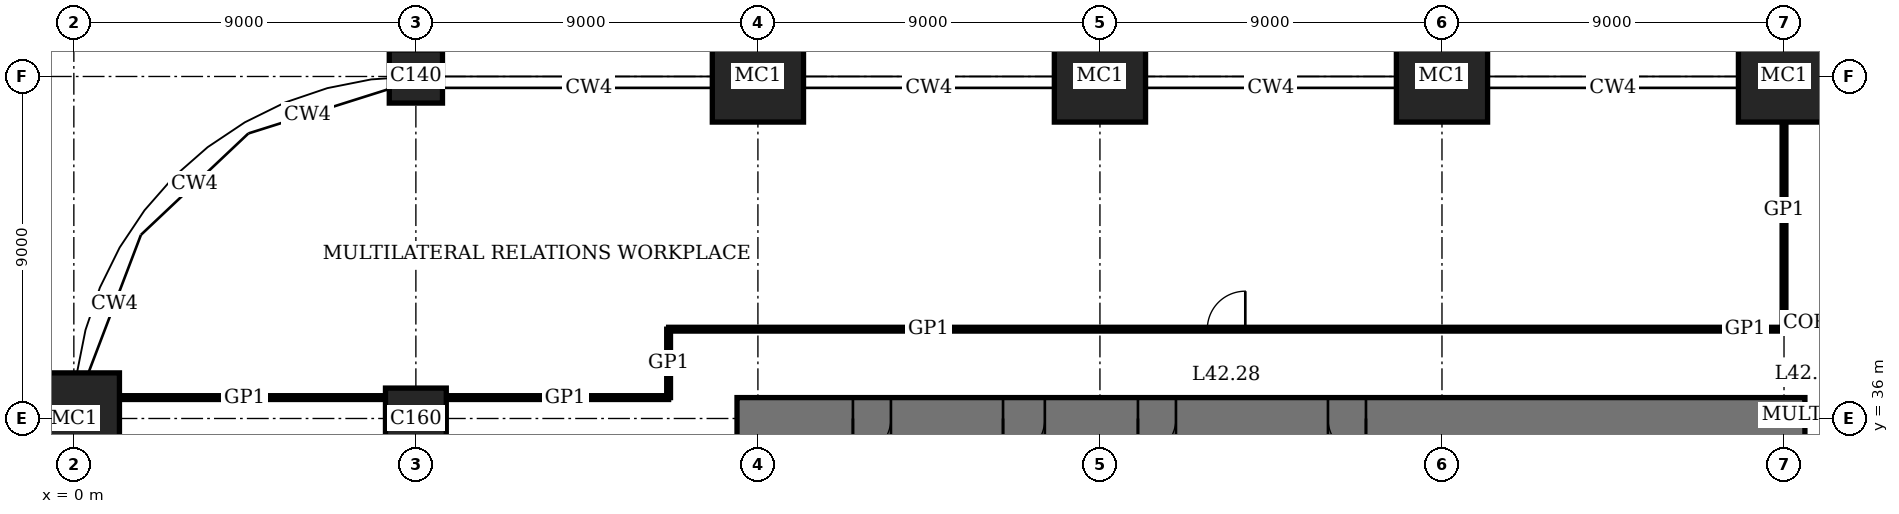
"""IFC4 building model, lengths in metres.
Left out: names, types, materials, properties, quantities, classifications, styles, units other than length and angle.
Written with IfcOpenShell. Run it as: python <this file> out.ifc"""

import sys

from ifc_helpers import new_model, si_unit, direction, frame, frame_2d, origin, origin_2d, place, context, subcontext, project, spatial, rectangle, extrude, element, fill, save


model = new_model("IFC4")
c1 = context("Model", 3, precision=1e-05, world=origin(), true_north=direction((0.0, 1.0)))
c2 = subcontext(c1, "Body", "Model", "MODEL_VIEW")
j1 = project(units=[si_unit("LENGTHUNIT", "METRE"), si_unit("PLANEANGLEUNIT", "RADIAN")], contexts=[c1])
p1 = place(None, origin())
s1 = spatial("IfcSite", under=j1, at=p1, CompositionType="ELEMENT")
p2 = place(p1, origin())
s2 = spatial("IfcBuilding", under=s1, at=p2, CompositionType="ELEMENT")
p3 = place(p2, frame((0.0, 0.0, 174.2)))
s3 = spatial("IfcBuildingStorey", under=s2, at=p3, CompositionType="ELEMENT", Elevation=174.2)
p4 = place(p3, frame((0.0, 36.0, 0.0), z_axis=(0.0, 0.0, 1.0), x_axis=(1.0, 0.0, 0.0)))
e1 = element("IfcColumn", 1, at=p4, inside=s3, PredefinedType="COLUMN", context=c2, shape_type="SweptSolid", body=[
    extrude(rectangle(XDim=2.4, YDim=2.4, at=origin_2d()), origin(), (0.0, 0.0, 1.0), 4.0),
])
p5 = place(p3, frame((9.0, 36.0, 0.0), z_axis=(0.0, 0.0, 1.0), x_axis=(1.0, 0.0, 0.0)))
e2 = element("IfcColumn", 2, at=p5, inside=s3, PredefinedType="COLUMN", context=c2, shape_type="SweptSolid", body=[
    extrude(rectangle(XDim=1.6, YDim=1.6, at=origin_2d()), origin(), (0.0, 0.0, 1.0), 4.0),
])
p6 = place(p3, frame((9.0, 45.0, 0.0), z_axis=(0.0, 0.0, 1.0), x_axis=(1.0, 0.0, 0.0)))
e3 = element("IfcColumn", 3, at=p6, inside=s3, PredefinedType="COLUMN", context=c2, shape_type="SweptSolid", body=[
    extrude(rectangle(XDim=1.4, YDim=1.4, at=origin_2d()), origin(), (0.0, 0.0, 1.0), 4.0),
])
for number, where, z_axis, x_axis in (
    (4, (18.0, 45.0, 0.0), (0.0, 0.0, 1.0), (1.0, 0.0, 0.0)),
    (5, (27.0, 45.0, 0.0), (0.0, 0.0, 1.0), (1.0, 0.0, 0.0)),
    (6, (36.0, 45.0, 0.0), (0.0, 0.0, 1.0), (1.0, 0.0, 0.0)),
    (7, (45.0, 45.0, 0.0), (0.0, 0.0, 1.0), (1.0, 0.0, 0.0)),
):
    element("IfcColumn", number, at=place(p3, frame(where, z_axis=z_axis, x_axis=x_axis)), inside=s3, PredefinedType="COLUMN", context=c2, shape_type="SweptSolid", body=[
        extrude(rectangle(XDim=2.4, YDim=2.4, at=origin_2d()), origin(), (0.0, 0.0, 1.0), 4.0),
    ])
p7 = place(p3, frame((45.55, 36.0, 0.0), z_axis=(0.0, 0.0, 1.0), x_axis=(-1.0, 0.0, 0.0)))
e8 = element("IfcWall", 8, at=p7, inside=s3, PredefinedType="SHEAR", context=c2, shape_type="SweptSolid", body=[
    extrude(rectangle(XDim=28.1, YDim=1.1, at=frame_2d((14.05, 0.0))), origin(), (0.0, 0.0, 1.0), 4.0),
])
p8 = place(p7, frame((11.55, 0.0, 0.0)))
e9 = element("IfcOpeningElement", 9, at=p8, cuts=e8, PredefinedType="OPENING", context=c2, shape_type="SweptSolid", body=[
    extrude(rectangle(XDim=1.0, YDim=2.4, at=frame_2d((0.5, 1.2))), frame((0.0, 0.56, 0.0), z_axis=(0.0, -1.0, 0.0), x_axis=(1.0, 0.0, 0.0)), (0.0, 0.0, 1.0), 1.12),
])
p9 = place(p7, frame((16.55, 0.0, 0.0)))
e10 = element("IfcOpeningElement", 10, at=p9, cuts=e8, PredefinedType="OPENING", context=c2, shape_type="SweptSolid", body=[
    extrude(rectangle(XDim=1.0, YDim=2.4, at=frame_2d((0.5, 1.2))), frame((0.0, 0.56, 0.0), z_axis=(0.0, -1.0, 0.0), x_axis=(1.0, 0.0, 0.0)), (0.0, 0.0, 1.0), 1.12),
])
p10 = place(p7, frame((20.0, 0.0, 0.0)))
e11 = element("IfcOpeningElement", 11, at=p10, cuts=e8, PredefinedType="OPENING", context=c2, shape_type="SweptSolid", body=[
    extrude(rectangle(XDim=1.1, YDim=2.4, at=frame_2d((0.55, 1.2))), frame((0.0, 0.56, 0.0), z_axis=(0.0, -1.0, 0.0), x_axis=(1.0, 0.0, 0.0)), (0.0, 0.0, 1.0), 1.12),
])
p11 = place(p7, frame((24.05, 0.0, 0.0)))
e12 = element("IfcOpeningElement", 12, at=p11, cuts=e8, PredefinedType="OPENING", context=c2, shape_type="SweptSolid", body=[
    extrude(rectangle(XDim=1.0, YDim=2.4, at=frame_2d((0.5, 1.2))), frame((0.0, 0.56, 0.0), z_axis=(0.0, -1.0, 0.0), x_axis=(1.0, 0.0, 0.0)), (0.0, 0.0, 1.0), 1.12),
])
p12 = place(p3, frame((1.2, 36.55, 0.0), z_axis=(0.0, 0.0, 1.0), x_axis=(1.0, 0.0, 0.0)))
e13 = element("IfcWall", 13, at=p12, inside=s3, PredefinedType="PARTITIONING", context=c2, shape_type="SweptSolid", body=[
    extrude(rectangle(XDim=7.0, YDim=0.1, at=frame_2d((3.5, 0.0))), origin(), (0.0, 0.0, 1.0), 3.75),
])
p13 = place(p3, frame((9.8, 36.55, 0.0), z_axis=(0.0, 0.0, 1.0), x_axis=(1.0, 0.0, 0.0)))
e14 = element("IfcWall", 14, at=p13, inside=s3, PredefinedType="PARTITIONING", context=c2, shape_type="SweptSolid", body=[
    extrude(rectangle(XDim=5.85, YDim=0.1, at=frame_2d((2.925, 0.0))), origin(), (0.0, 0.0, 1.0), 3.75),
])
p14 = place(p3, frame((15.65, 38.35, 0.0), z_axis=(0.0, 0.0, 1.0), x_axis=(1.0, 0.0, 0.0)))
e15 = element("IfcWall", 15, at=p14, inside=s3, PredefinedType="PARTITIONING", context=c2, shape_type="SweptSolid", body=[
    extrude(rectangle(XDim=29.35, YDim=0.1, at=frame_2d((14.675, 0.0))), origin(), (0.0, 0.0, 1.0), 3.75),
])
p15 = place(p14, frame((14.175, 0.0, 0.0)))
e16 = element("IfcOpeningElement", 16, at=p15, cuts=e15, PredefinedType="OPENING", context=c2, shape_type="SweptSolid", body=[
    extrude(rectangle(XDim=1.0, YDim=2.4, at=frame_2d((0.5, 1.2))), frame((0.0, 0.06, 0.0), z_axis=(0.0, -1.0, 0.0), x_axis=(1.0, 0.0, 0.0)), (0.0, 0.0, 1.0), 0.12),
])
p16 = place(p3, frame((45.0, 38.35, 0.0), z_axis=(0.0, 0.0, 1.0), x_axis=(1.0, 0.0, 0.0)))
e17 = element("IfcWall", 17, at=p16, inside=s3, PredefinedType="PARTITIONING", context=c2, shape_type="SweptSolid", body=[
    extrude(rectangle(XDim=2.35, YDim=0.1, at=frame_2d((1.175, 0.0))), origin(), (0.0, 0.0, 1.0), 3.75),
])
p17 = place(p3, frame((15.65, 36.55, 0.0), z_axis=(0.0, 0.0, 1.0), x_axis=(0.0, 1.0, 0.0)))
e18 = element("IfcWall", 18, at=p17, inside=s3, PredefinedType="PARTITIONING", context=c2, shape_type="SweptSolid", body=[
    extrude(rectangle(XDim=1.8, YDim=0.1, at=frame_2d((0.9, 0.0))), origin(), (0.0, 0.0, 1.0), 3.75),
])
p18 = place(p3, frame((45.0, 38.35, 0.0), z_axis=(0.0, 0.0, 1.0), x_axis=(0.0, 1.0, 0.0)))
e19 = element("IfcWall", 19, at=p18, inside=s3, PredefinedType="PARTITIONING", context=c2, shape_type="SweptSolid", body=[
    extrude(rectangle(XDim=5.45, YDim=0.1, at=frame_2d((2.725, 0.0))), origin(), (0.0, 0.0, 1.0), 3.05),
])
p19 = place(p8, origin())
e20 = element("IfcDoor", 20, at=p19, inside=s3, OperationType="SINGLE_SWING_RIGHT", PredefinedType="DOOR", context=c2, shape_type="SweptSolid", body=[
    extrude(rectangle(XDim=1.0, YDim=2.4, at=frame_2d((0.5, 1.2))), frame((0.0, 0.025, 0.0), z_axis=(0.0, -1.0, 0.0), x_axis=(1.0, 0.0, 0.0)), (0.0, 0.0, 1.0), 0.05),
    extrude(rectangle(XDim=0.04, YDim=2.4, at=frame_2d((0.02, 1.2))), frame((0.0, 0.4, 0.0), z_axis=(0.0, -1.0, 0.0), x_axis=(1.0, 0.0, 0.0)), (0.0, 0.0, 1.0), 0.8),
    extrude(rectangle(XDim=0.04, YDim=2.4, at=frame_2d((0.98, 1.2))), frame((0.0, 0.4, 0.0), z_axis=(0.0, -1.0, 0.0), x_axis=(1.0, 0.0, 0.0)), (0.0, 0.0, 1.0), 0.8),
    extrude(rectangle(XDim=1.0, YDim=0.04, at=frame_2d((0.5, 2.38))), frame((0.0, 0.4, 0.0), z_axis=(0.0, -1.0, 0.0), x_axis=(1.0, 0.0, 0.0)), (0.0, 0.0, 1.0), 0.8),
])
fill(e9, e20)
p20 = place(p9, origin())
e21 = element("IfcDoor", 21, at=p20, inside=s3, OperationType="SINGLE_SWING_LEFT", PredefinedType="DOOR", context=c2, shape_type="SweptSolid", body=[
    extrude(rectangle(XDim=1.0, YDim=2.4, at=frame_2d((0.5, 1.2))), frame((0.0, 0.025, 0.0), z_axis=(0.0, -1.0, 0.0), x_axis=(1.0, 0.0, 0.0)), (0.0, 0.0, 1.0), 0.05),
    extrude(rectangle(XDim=0.04, YDim=2.4, at=frame_2d((0.02, 1.2))), frame((0.0, 0.4, 0.0), z_axis=(0.0, -1.0, 0.0), x_axis=(1.0, 0.0, 0.0)), (0.0, 0.0, 1.0), 0.8),
    extrude(rectangle(XDim=0.04, YDim=2.4, at=frame_2d((0.98, 1.2))), frame((0.0, 0.4, 0.0), z_axis=(0.0, -1.0, 0.0), x_axis=(1.0, 0.0, 0.0)), (0.0, 0.0, 1.0), 0.8),
    extrude(rectangle(XDim=1.0, YDim=0.04, at=frame_2d((0.5, 2.38))), frame((0.0, 0.4, 0.0), z_axis=(0.0, -1.0, 0.0), x_axis=(1.0, 0.0, 0.0)), (0.0, 0.0, 1.0), 0.8),
])
fill(e10, e21)
p21 = place(p10, origin())
e22 = element("IfcDoor", 22, at=p21, inside=s3, OperationType="SINGLE_SWING_LEFT", PredefinedType="DOOR", context=c2, shape_type="SweptSolid", body=[
    extrude(rectangle(XDim=1.1, YDim=2.4, at=frame_2d((0.55, 1.2))), frame((0.0, 0.025, 0.0), z_axis=(0.0, -1.0, 0.0), x_axis=(1.0, 0.0, 0.0)), (0.0, 0.0, 1.0), 0.05),
    extrude(rectangle(XDim=0.04, YDim=2.4, at=frame_2d((0.02, 1.2))), frame((0.0, 0.44, 0.0), z_axis=(0.0, -1.0, 0.0), x_axis=(1.0, 0.0, 0.0)), (0.0, 0.0, 1.0), 0.88),
    extrude(rectangle(XDim=0.04, YDim=2.4, at=frame_2d((1.08, 1.2))), frame((0.0, 0.44, 0.0), z_axis=(0.0, -1.0, 0.0), x_axis=(1.0, 0.0, 0.0)), (0.0, 0.0, 1.0), 0.88),
    extrude(rectangle(XDim=1.1, YDim=0.04, at=frame_2d((0.55, 2.38))), frame((0.0, 0.44, 0.0), z_axis=(0.0, -1.0, 0.0), x_axis=(1.0, 0.0, 0.0)), (0.0, 0.0, 1.0), 0.88),
])
fill(e11, e22)
p22 = place(p11, origin())
e23 = element("IfcDoor", 23, at=p22, inside=s3, OperationType="SINGLE_SWING_LEFT", PredefinedType="DOOR", context=c2, shape_type="SweptSolid", body=[
    extrude(rectangle(XDim=1.0, YDim=2.4, at=frame_2d((0.5, 1.2))), frame((0.0, 0.025, 0.0), z_axis=(0.0, -1.0, 0.0), x_axis=(1.0, 0.0, 0.0)), (0.0, 0.0, 1.0), 0.05),
    extrude(rectangle(XDim=0.04, YDim=2.4, at=frame_2d((0.02, 1.2))), frame((0.0, 0.4, 0.0), z_axis=(0.0, -1.0, 0.0), x_axis=(1.0, 0.0, 0.0)), (0.0, 0.0, 1.0), 0.8),
    extrude(rectangle(XDim=0.04, YDim=2.4, at=frame_2d((0.98, 1.2))), frame((0.0, 0.4, 0.0), z_axis=(0.0, -1.0, 0.0), x_axis=(1.0, 0.0, 0.0)), (0.0, 0.0, 1.0), 0.8),
    extrude(rectangle(XDim=1.0, YDim=0.04, at=frame_2d((0.5, 2.38))), frame((0.0, 0.4, 0.0), z_axis=(0.0, -1.0, 0.0), x_axis=(1.0, 0.0, 0.0)), (0.0, 0.0, 1.0), 0.8),
])
fill(e12, e23)
p23 = place(p15, origin())
e24 = element("IfcDoor", 24, at=p23, inside=s3, OperationType="SINGLE_SWING_LEFT", PredefinedType="DOOR", context=c2, shape_type="SweptSolid", body=[
    extrude(rectangle(XDim=1.0, YDim=2.4, at=frame_2d((0.5, 1.2))), frame((0.0, 0.02, 0.0), z_axis=(0.0, -1.0, 0.0), x_axis=(1.0, 0.0, 0.0)), (0.0, 0.0, 1.0), 0.04),
])
fill(e16, e24)
save(model, sys.argv[1])
